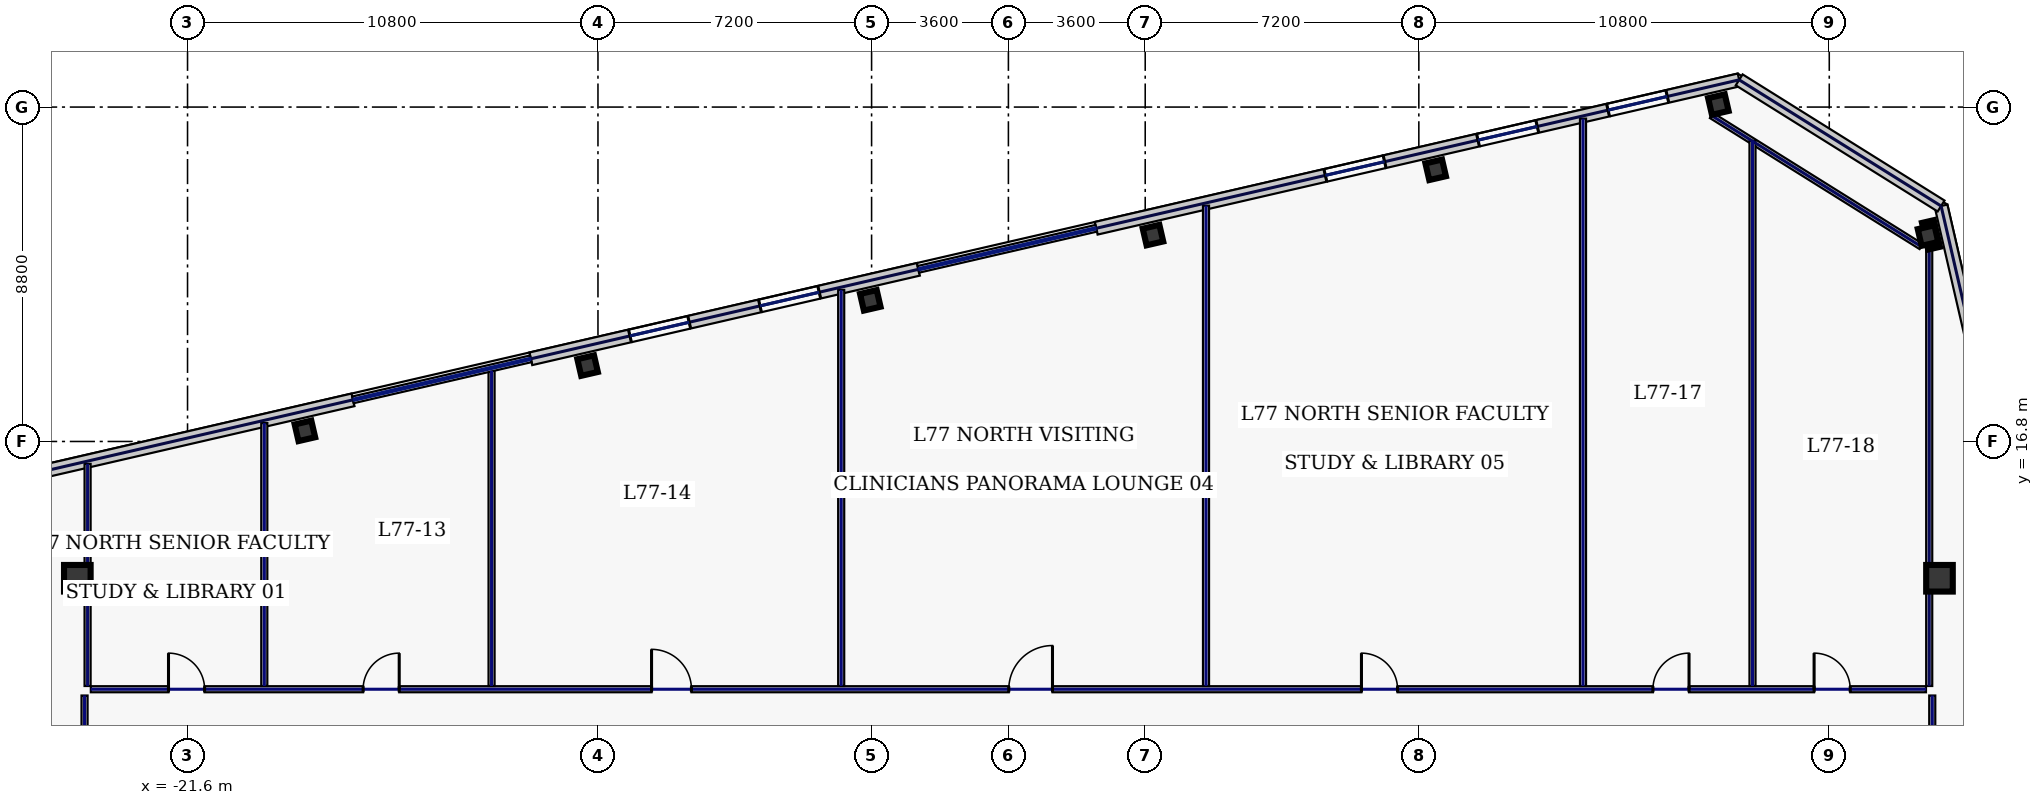
"""IFC4 building model, lengths in metres.
Left out: names, types, materials, properties, quantities, classifications, styles, units other than length and angle.
Written with IfcOpenShell. Run it as: python <this file> out.ifc"""

import sys

from ifc_helpers import new_model, si_unit, direction, frame, frame_2d, origin, origin_2d, place, context, subcontext, project, spatial, rectangle, hollow_rectangle, extrude, element, fill, save


model = new_model("IFC4")
c1 = context("Model", 3, precision=1e-05, world=origin(), true_north=direction((0.0, 1.0)))
c2 = subcontext(c1, "Body", "Model", "MODEL_VIEW")
j1 = project(units=[si_unit("LENGTHUNIT", "METRE"), si_unit("PLANEANGLEUNIT", "RADIAN")], contexts=[c1])
p1 = place(None, origin())
s1 = spatial("IfcSite", under=j1, at=p1, CompositionType="ELEMENT")
p2 = place(p1, origin())
s2 = spatial("IfcBuilding", under=s1, at=p2, CompositionType="ELEMENT")
p3 = place(p2, frame((0.0, 0.0, 329.0)))
s3 = spatial("IfcBuildingStorey", under=s2, at=p3, CompositionType="ELEMENT", Elevation=329.0)
for number, where, z_axis, x_axis in (
    (1, (-24.5, 13.2, 0.0), (0.0, 0.0, 1.0), (1.0, 0.0, 0.0)),
    (2, (24.5, 13.2, 0.0), (0.0, 0.0, 1.0), (1.0, 0.0, 0.0)),
):
    element("IfcColumn", number, at=place(p3, frame(where, z_axis=z_axis, x_axis=x_axis)), inside=s3, PredefinedType="COLUMN", context=c2, shape_type="SweptSolid", body=[
        extrude(hollow_rectangle(XDim=0.7, YDim=0.7, WallThickness=0.032, at=origin_2d()), origin(), (0.0, 0.0, 1.0), 3.68),
    ])
for number, where, z_axis, x_axis in (
    (3, (18.682, 25.666, 0.0), (0.0, 0.0, 1.0), (0.974, 0.225, 0.0)),
    (4, (11.243, 23.949, 0.0), (0.0, 0.0, 1.0), (0.974, 0.225, 0.0)),
    (5, (3.804, 22.232, 0.0), (0.0, 0.0, 1.0), (0.974, 0.225, 0.0)),
    (6, (-3.634, 20.514, 0.0), (0.0, 0.0, 1.0), (0.974, 0.225, 0.0)),
    (7, (-11.073, 18.797, 0.0), (0.0, 0.0, 1.0), (0.974, 0.225, 0.0)),
    (8, (-18.511, 17.08, 0.0), (0.0, 0.0, 1.0), (0.974, 0.225, 0.0)),
    (9, (24.198, 22.219, 0.0), (0.0, 0.0, 1.0), (0.974, 0.225, 0.0)),
):
    element("IfcColumn", number, at=place(p3, frame(where, z_axis=z_axis, x_axis=x_axis)), inside=s3, PredefinedType="COLUMN", context=c2, shape_type="SweptSolid", body=[
        extrude(hollow_rectangle(XDim=0.45, YDim=0.45, WallThickness=0.022, at=origin_2d()), origin(), (0.0, 0.0, 1.0), 3.68),
    ])
p4 = place(p3, frame((19.229, 26.316, 0.0), z_axis=(0.0, 0.0, 1.0), x_axis=(-0.974372473594, -0.224940620392, 0.0)))
e10 = element("IfcWall", 10, at=p4, inside=s3, PredefinedType="STANDARD", context=c2, shape_type="SweptSolid", body=[
    extrude(rectangle(XDim=17.366, YDim=0.34, at=frame_2d((8.683, 0.0))), origin(), (0.0, 0.0, 1.0), 3.68),
])
p5 = place(p4, frame((9.576, 0.0, 0.22)))
e11 = element("IfcOpeningElement", 11, at=p5, cuts=e10, PredefinedType="OPENING", context=c2, shape_type="SweptSolid", body=[
    extrude(rectangle(XDim=1.6, YDim=1.2, at=frame_2d((0.8, 0.6))), frame((0.0, 0.18, 0.0), z_axis=(0.0, -1.0, 0.0), x_axis=(1.0, 0.0, 0.0)), (0.0, 0.0, 1.0), 0.36),
])
p6 = place(p4, frame((5.453, 0.0, 0.22)))
e12 = element("IfcOpeningElement", 12, at=p6, cuts=e10, PredefinedType="OPENING", context=c2, shape_type="SweptSolid", body=[
    extrude(rectangle(XDim=1.6, YDim=1.2, at=frame_2d((0.8, 0.6))), frame((0.0, 0.18, 0.0), z_axis=(0.0, -1.0, 0.0), x_axis=(1.0, 0.0, 0.0)), (0.0, 0.0, 1.0), 0.36),
])
p7 = place(p4, frame((1.941, 0.0, 0.22)))
e13 = element("IfcOpeningElement", 13, at=p7, cuts=e10, PredefinedType="OPENING", context=c2, shape_type="SweptSolid", body=[
    extrude(rectangle(XDim=1.6, YDim=1.2, at=frame_2d((0.8, 0.6))), frame((0.0, 0.18, 0.0), z_axis=(0.0, -1.0, 0.0), x_axis=(1.0, 0.0, 0.0)), (0.0, 0.0, 1.0), 0.36),
])
p8 = place(p3, frame((-2.368, 21.33, 0.0), z_axis=(0.0, 0.0, 1.0), x_axis=(-0.974367213107, -0.224963405961, 0.0)))
e14 = element("IfcWall", 14, at=p8, inside=s3, PredefinedType="STANDARD", context=c2, shape_type="SweptSolid", body=[
    extrude(rectangle(XDim=10.468, YDim=0.34, at=frame_2d((5.234, 0.0))), origin(), (0.0, 0.0, 1.0), 3.68),
])
p9 = place(p8, frame((6.19, 0.0, 0.22)))
e15 = element("IfcOpeningElement", 15, at=p9, cuts=e14, PredefinedType="OPENING", context=c2, shape_type="SweptSolid", body=[
    extrude(rectangle(XDim=1.6, YDim=1.2, at=frame_2d((0.8, 0.6))), frame((0.0, 0.18, 0.0), z_axis=(0.0, -1.0, 0.0), x_axis=(1.0, 0.0, 0.0)), (0.0, 0.0, 1.0), 0.36),
])
p10 = place(p8, frame((2.678, 0.0, 0.22)))
e16 = element("IfcOpeningElement", 16, at=p10, cuts=e14, PredefinedType="OPENING", context=c2, shape_type="SweptSolid", body=[
    extrude(rectangle(XDim=1.6, YDim=1.2, at=frame_2d((0.8, 0.6))), frame((0.0, 0.18, 0.0), z_axis=(0.0, -1.0, 0.0), x_axis=(1.0, 0.0, 0.0)), (0.0, 0.0, 1.0), 0.36),
])
p11 = place(p3, frame((-17.245, 17.895, 0.0), z_axis=(0.0, 0.0, 1.0), x_axis=(-0.97437318493, -0.224937539085, 0.0)))
e17 = element("IfcWall", 17, at=p11, inside=s3, PredefinedType="STANDARD", context=c2, shape_type="SweptSolid", body=[
    extrude(rectangle(XDim=17.366, YDim=0.34, at=frame_2d((8.683, 0.0))), origin(), (0.0, 0.0, 1.0), 3.68),
])
p12 = place(p11, frame((13.825, 0.0, 0.22)))
e18 = element("IfcOpeningElement", 18, at=p12, cuts=e17, PredefinedType="OPENING", context=c2, shape_type="SweptSolid", body=[
    extrude(rectangle(XDim=1.6, YDim=1.2, at=frame_2d((0.8, 0.6))), frame((0.0, 0.18, 0.0), z_axis=(0.0, -1.0, 0.0), x_axis=(1.0, 0.0, 0.0)), (0.0, 0.0, 1.0), 0.36),
])
p13 = place(p11, frame((10.313, 0.0, 0.22)))
e19 = element("IfcOpeningElement", 19, at=p13, cuts=e17, PredefinedType="OPENING", context=c2, shape_type="SweptSolid", body=[
    extrude(rectangle(XDim=1.6, YDim=1.2, at=frame_2d((0.8, 0.6))), frame((0.0, 0.18, 0.0), z_axis=(0.0, -1.0, 0.0), x_axis=(1.0, 0.0, 0.0)), (0.0, 0.0, 1.0), 0.36),
])
p14 = place(p3, frame((32.686, -12.276, 0.0), z_axis=(0.0, 0.0, 1.0), x_axis=(-0.224953091034, 0.974369594576, 0.0)))
e20 = element("IfcWall", 20, at=p14, inside=s3, PredefinedType="STANDARD", context=c2, shape_type="SweptSolid", body=[
    extrude(rectangle(XDim=36.2, YDim=0.34, at=frame_2d((18.1, 0.0))), origin(), (0.0, 0.0, 1.0), 3.68),
])
p15 = place(p14, frame((3.725, 0.0, 0.22)))
e21 = element("IfcOpeningElement", 21, at=p15, cuts=e20, PredefinedType="OPENING", context=c2, shape_type="SweptSolid", body=[
    extrude(rectangle(XDim=1.6, YDim=1.2, at=frame_2d((0.8, 0.6))), frame((0.0, 0.18, 0.0), z_axis=(0.0, -1.0, 0.0), x_axis=(1.0, 0.0, 0.0)), (0.0, 0.0, 1.0), 0.36),
])
p16 = place(p14, frame((21.825, 0.0, 0.22)))
e22 = element("IfcOpeningElement", 22, at=p16, cuts=e20, PredefinedType="OPENING", context=c2, shape_type="SweptSolid", body=[
    extrude(rectangle(XDim=1.6, YDim=1.2, at=frame_2d((0.8, 0.6))), frame((0.0, 0.18, 0.0), z_axis=(0.0, -1.0, 0.0), x_axis=(1.0, 0.0, 0.0)), (0.0, 0.0, 1.0), 0.36),
])
p17 = place(p14, frame((30.875, 0.0, 0.22)))
e23 = element("IfcOpeningElement", 23, at=p17, cuts=e20, PredefinedType="OPENING", context=c2, shape_type="SweptSolid", body=[
    extrude(rectangle(XDim=1.6, YDim=1.2, at=frame_2d((0.8, 0.6))), frame((0.0, 0.18, 0.0), z_axis=(0.0, -1.0, 0.0), x_axis=(1.0, 0.0, 0.0)), (0.0, 0.0, 1.0), 0.36),
])
p18 = place(p3, frame((24.542, 22.996, 0.0), z_axis=(0.0, 0.0, 1.0), x_axis=(-0.848055220921, 0.529907862057, 0.0)))
e24 = element("IfcWall", 24, at=p18, inside=s3, PredefinedType="STANDARD", context=c2, shape_type="SweptSolid", body=[
    extrude(rectangle(XDim=6.265, YDim=0.34, at=frame_2d((3.132, 0.0))), origin(), (0.0, 0.0, 1.0), 3.68),
])
p19 = place(p3, frame((24.018, 21.931, 0.0), z_axis=(0.0, 0.0, 1.0), x_axis=(-0.848051009591, 0.529914601736, 0.0)))
e25 = element("IfcWall", 25, at=p19, inside=s3, PredefinedType="PARTITIONING", context=c2, shape_type="SweptSolid", body=[
    extrude(rectangle(XDim=6.505, YDim=0.16, at=frame_2d((3.253, 0.0))), origin(), (0.0, 0.0, 1.0), 1.475),
])
p20 = place(p3, frame((-24.31, -10.015, 0.0), z_axis=(0.0, 0.0, 1.0), x_axis=(0.0, 1.0, 0.0)))
e26 = element("IfcWall", 26, at=p20, inside=s3, PredefinedType="PARTITIONING", context=c2, shape_type="SweptSolid", body=[
    extrude(rectangle(XDim=20.13, YDim=0.16, at=frame_2d((10.065, 0.0))), origin(), (0.0, 0.0, 1.0), 3.68),
])
p21 = place(p20, frame((2.169, 0.0, 0.0)))
e27 = element("IfcOpeningElement", 27, at=p21, cuts=e26, PredefinedType="OPENING", context=c2, shape_type="SweptSolid", body=[
    extrude(rectangle(XDim=0.95, YDim=2.2, at=frame_2d((0.475, 1.1))), frame((0.0, 0.09, 0.0), z_axis=(0.0, -1.0, 0.0), x_axis=(1.0, 0.0, 0.0)), (0.0, 0.0, 1.0), 0.18),
])
p22 = place(p20, frame((7.025, 0.0, 0.0)))
e28 = element("IfcOpeningElement", 28, at=p22, cuts=e26, PredefinedType="OPENING", context=c2, shape_type="SweptSolid", body=[
    extrude(rectangle(XDim=0.95, YDim=2.2, at=frame_2d((0.475, 1.1))), frame((0.0, 0.09, 0.0), z_axis=(0.0, -1.0, 0.0), x_axis=(1.0, 0.0, 0.0)), (0.0, 0.0, 1.0), 0.18),
])
p23 = place(p20, frame((12.225, 0.0, 0.0)))
e29 = element("IfcOpeningElement", 29, at=p23, cuts=e26, PredefinedType="OPENING", context=c2, shape_type="SweptSolid", body=[
    extrude(rectangle(XDim=0.95, YDim=2.2, at=frame_2d((0.475, 1.1))), frame((0.0, 0.09, 0.0), z_axis=(0.0, -1.0, 0.0), x_axis=(1.0, 0.0, 0.0)), (0.0, 0.0, 1.0), 0.18),
])
p24 = place(p20, frame((17.131, 0.0, 0.0)))
e30 = element("IfcOpeningElement", 30, at=p24, cuts=e26, PredefinedType="OPENING", context=c2, shape_type="SweptSolid", body=[
    extrude(rectangle(XDim=0.95, YDim=2.2, at=frame_2d((0.475, 1.1))), frame((0.0, 0.09, 0.0), z_axis=(0.0, -1.0, 0.0), x_axis=(1.0, 0.0, 0.0)), (0.0, 0.0, 1.0), 0.18),
])
p25 = place(p3, frame((-24.145, 10.28, 0.0), z_axis=(0.0, 0.0, 1.0), x_axis=(1.0, 0.0, 0.0)))
e31 = element("IfcWall", 31, at=p25, inside=s3, PredefinedType="PARTITIONING", context=c2, shape_type="SweptSolid", body=[
    extrude(rectangle(XDim=48.29, YDim=0.16, at=frame_2d((24.145, 0.0))), origin(), (0.0, 0.0, 1.0), 3.68),
])
p26 = place(p25, frame((2.044, 0.0, 0.0)))
e32 = element("IfcOpeningElement", 32, at=p26, cuts=e31, PredefinedType="OPENING", context=c2, shape_type="SweptSolid", body=[
    extrude(rectangle(XDim=0.95, YDim=2.2, at=frame_2d((0.475, 1.1))), frame((0.0, 0.09, 0.0), z_axis=(0.0, -1.0, 0.0), x_axis=(1.0, 0.0, 0.0)), (0.0, 0.0, 1.0), 0.18),
])
p27 = place(p25, frame((7.165, 0.0, 0.0)))
e33 = element("IfcOpeningElement", 33, at=p27, cuts=e31, PredefinedType="OPENING", context=c2, shape_type="SweptSolid", body=[
    extrude(rectangle(XDim=0.95, YDim=2.2, at=frame_2d((0.475, 1.1))), frame((0.0, 0.09, 0.0), z_axis=(0.0, -1.0, 0.0), x_axis=(1.0, 0.0, 0.0)), (0.0, 0.0, 1.0), 0.18),
])
p28 = place(p25, frame((14.755, 0.0, 0.0)))
e34 = element("IfcOpeningElement", 34, at=p28, cuts=e31, PredefinedType="OPENING", context=c2, shape_type="SweptSolid", body=[
    extrude(rectangle(XDim=1.05, YDim=2.2, at=frame_2d((0.525, 1.1))), frame((0.0, 0.09, 0.0), z_axis=(0.0, -1.0, 0.0), x_axis=(1.0, 0.0, 0.0)), (0.0, 0.0, 1.0), 0.18),
])
p29 = place(p25, frame((24.155, 0.0, 0.0)))
e35 = element("IfcOpeningElement", 35, at=p29, cuts=e31, PredefinedType="OPENING", context=c2, shape_type="SweptSolid", body=[
    extrude(rectangle(XDim=1.15, YDim=2.2, at=frame_2d((0.575, 1.1))), frame((0.0, 0.09, 0.0), z_axis=(0.0, -1.0, 0.0), x_axis=(1.0, 0.0, 0.0)), (0.0, 0.0, 1.0), 0.18),
])
p30 = place(p25, frame((33.435, 0.0, 0.0)))
e36 = element("IfcOpeningElement", 36, at=p30, cuts=e31, PredefinedType="OPENING", context=c2, shape_type="SweptSolid", body=[
    extrude(rectangle(XDim=0.95, YDim=2.2, at=frame_2d((0.475, 1.1))), frame((0.0, 0.09, 0.0), z_axis=(0.0, -1.0, 0.0), x_axis=(1.0, 0.0, 0.0)), (0.0, 0.0, 1.0), 0.18),
])
p31 = place(p25, frame((41.105, 0.0, 0.0)))
e37 = element("IfcOpeningElement", 37, at=p31, cuts=e31, PredefinedType="OPENING", context=c2, shape_type="SweptSolid", body=[
    extrude(rectangle(XDim=0.95, YDim=2.2, at=frame_2d((0.475, 1.1))), frame((0.0, 0.09, 0.0), z_axis=(0.0, -1.0, 0.0), x_axis=(1.0, 0.0, 0.0)), (0.0, 0.0, 1.0), 0.18),
])
p32 = place(p25, frame((45.346, 0.0, 0.0)))
e38 = element("IfcOpeningElement", 38, at=p32, cuts=e31, PredefinedType="OPENING", context=c2, shape_type="SweptSolid", body=[
    extrude(rectangle(XDim=0.95, YDim=2.2, at=frame_2d((0.475, 1.1))), frame((0.0, 0.09, 0.0), z_axis=(0.0, -1.0, 0.0), x_axis=(1.0, 0.0, 0.0)), (0.0, 0.0, 1.0), 0.18),
])
p33 = place(p3, frame((24.31, 10.115, 0.0), z_axis=(0.0, 0.0, 1.0), x_axis=(0.0, -1.0, 0.0)))
e39 = element("IfcWall", 39, at=p33, inside=s3, PredefinedType="PARTITIONING", context=c2, shape_type="SweptSolid", body=[
    extrude(rectangle(XDim=20.13, YDim=0.16, at=frame_2d((10.065, 0.0))), origin(), (0.0, 0.0, 1.0), 3.68),
])
p34 = place(p33, frame((14.581, 0.0, 0.0)))
e40 = element("IfcOpeningElement", 40, at=p34, cuts=e39, PredefinedType="OPENING", context=c2, shape_type="SweptSolid", body=[
    extrude(rectangle(XDim=0.95, YDim=2.2, at=frame_2d((0.475, 1.1))), frame((0.0, 0.09, 0.0), z_axis=(0.0, -1.0, 0.0), x_axis=(1.0, 0.0, 0.0)), (0.0, 0.0, 1.0), 0.18),
])
p35 = place(p33, frame((4.819, 0.0, 0.0)))
e41 = element("IfcOpeningElement", 41, at=p35, cuts=e39, PredefinedType="OPENING", context=c2, shape_type="SweptSolid", body=[
    extrude(rectangle(XDim=0.95, YDim=2.2, at=frame_2d((0.475, 1.1))), frame((0.0, 0.09, 0.0), z_axis=(0.0, -1.0, 0.0), x_axis=(1.0, 0.0, 0.0)), (0.0, 0.0, 1.0), 0.18),
])
p36 = place(p3, frame((-24.23, 10.365, 0.0), z_axis=(0.0, 0.0, 1.0), x_axis=(0.0, 1.0, 0.0)))
e42 = element("IfcWall", 42, at=p36, inside=s3, PredefinedType="PARTITIONING", context=c2, shape_type="SweptSolid", body=[
    extrude(rectangle(XDim=5.846, YDim=0.16, at=frame_2d((2.923, 0.0))), origin(), (0.0, 0.0, 1.0), 2.075),
])
p37 = place(p3, frame((24.23, 10.365, 0.0), z_axis=(0.0, 0.0, 1.0), x_axis=(0.0, 1.0, 0.0)))
e43 = element("IfcWall", 43, at=p37, inside=s3, PredefinedType="PARTITIONING", context=c2, shape_type="SweptSolid", body=[
    extrude(rectangle(XDim=12.206, YDim=0.16, at=frame_2d((6.103, 0.0))), origin(), (0.0, 0.0, 1.0), 1.475),
])
p38 = place(p3, frame((-19.58, 10.365, 0.0), z_axis=(0.0, 0.0, 1.0), x_axis=(0.0, 1.0, 0.0)))
e44 = element("IfcWall", 44, at=p38, inside=s3, PredefinedType="PARTITIONING", context=c2, shape_type="SweptSolid", body=[
    extrude(rectangle(XDim=6.919, YDim=0.16, at=frame_2d((3.46, 0.0))), origin(), (0.0, 0.0, 1.0), 3.68),
])
p39 = place(p3, frame((-13.6, 10.365, 0.0), z_axis=(0.0, 0.0, 1.0), x_axis=(0.0, 1.0, 0.0)))
e45 = element("IfcWall", 45, at=p39, inside=s3, PredefinedType="PARTITIONING", context=c2, shape_type="SweptSolid", body=[
    extrude(rectangle(XDim=8.3, YDim=0.16, at=frame_2d((4.15, 0.0))), origin(), (0.0, 0.0, 1.0), 3.68),
])
p40 = place(p3, frame((-4.4, 10.365, 0.0), z_axis=(0.0, 0.0, 1.0), x_axis=(0.0, 1.0, 0.0)))
e46 = element("IfcWall", 46, at=p40, inside=s3, PredefinedType="PARTITIONING", context=c2, shape_type="SweptSolid", body=[
    extrude(rectangle(XDim=10.424, YDim=0.16, at=frame_2d((5.212, 0.0))), origin(), (0.0, 0.0, 1.0), 3.68),
])
p41 = place(p3, frame((5.2, 10.365, 0.0), z_axis=(0.0, 0.0, 1.0), x_axis=(0.0, 1.0, 0.0)))
e47 = element("IfcWall", 47, at=p41, inside=s3, PredefinedType="PARTITIONING", context=c2, shape_type="SweptSolid", body=[
    extrude(rectangle(XDim=12.64, YDim=0.16, at=frame_2d((6.32, 0.0))), origin(), (0.0, 0.0, 1.0), 3.68),
])
p42 = place(p3, frame((15.12, 10.365, 0.0), z_axis=(0.0, 0.0, 1.0), x_axis=(0.0, 1.0, 0.0)))
e48 = element("IfcWall", 48, at=p42, inside=s3, PredefinedType="PARTITIONING", context=c2, shape_type="SweptSolid", body=[
    extrude(rectangle(XDim=14.931, YDim=0.16, at=frame_2d((7.465, 0.0))), origin(), (0.0, 0.0, 1.0), 3.68),
])
p43 = place(p3, frame((19.58, 10.365, 0.0), z_axis=(0.0, 0.0, 1.0), x_axis=(0.0, 1.0, 0.0)))
e49 = element("IfcWall", 49, at=p43, inside=s3, PredefinedType="PARTITIONING", context=c2, shape_type="SweptSolid", body=[
    extrude(rectangle(XDim=14.348, YDim=0.16, at=frame_2d((7.174, 0.0))), origin(), (0.0, 0.0, 1.0), 3.68),
])
p44 = place(p5, origin())
e50 = element("IfcWindow", 50, at=p44, inside=s3, PartitioningType="SINGLE_PANEL", PredefinedType="WINDOW", context=c2, shape_type="SweptSolid", body=[
    extrude(rectangle(XDim=1.6, YDim=1.2, at=frame_2d((0.8, 0.6))), frame((0.0, 0.03, 0.0), z_axis=(0.0, -1.0, 0.0), x_axis=(1.0, 0.0, 0.0)), (0.0, 0.0, 1.0), 0.06),
])
fill(e11, e50)
p45 = place(p6, origin())
e51 = element("IfcWindow", 51, at=p45, inside=s3, PartitioningType="SINGLE_PANEL", PredefinedType="WINDOW", context=c2, shape_type="SweptSolid", body=[
    extrude(rectangle(XDim=1.6, YDim=1.2, at=frame_2d((0.8, 0.6))), frame((0.0, 0.03, 0.0), z_axis=(0.0, -1.0, 0.0), x_axis=(1.0, 0.0, 0.0)), (0.0, 0.0, 1.0), 0.06),
])
fill(e12, e51)
p46 = place(p7, origin())
e52 = element("IfcWindow", 52, at=p46, inside=s3, PartitioningType="SINGLE_PANEL", PredefinedType="WINDOW", context=c2, shape_type="SweptSolid", body=[
    extrude(rectangle(XDim=1.6, YDim=1.2, at=frame_2d((0.8, 0.6))), frame((0.0, 0.03, 0.0), z_axis=(0.0, -1.0, 0.0), x_axis=(1.0, 0.0, 0.0)), (0.0, 0.0, 1.0), 0.06),
])
fill(e13, e52)
p47 = place(p9, origin())
e53 = element("IfcWindow", 53, at=p47, inside=s3, PartitioningType="SINGLE_PANEL", PredefinedType="WINDOW", context=c2, shape_type="SweptSolid", body=[
    extrude(rectangle(XDim=1.6, YDim=1.2, at=frame_2d((0.8, 0.6))), frame((0.0, 0.03, 0.0), z_axis=(0.0, -1.0, 0.0), x_axis=(1.0, 0.0, 0.0)), (0.0, 0.0, 1.0), 0.06),
])
fill(e15, e53)
p48 = place(p10, origin())
e54 = element("IfcWindow", 54, at=p48, inside=s3, PartitioningType="SINGLE_PANEL", PredefinedType="WINDOW", context=c2, shape_type="SweptSolid", body=[
    extrude(rectangle(XDim=1.6, YDim=1.2, at=frame_2d((0.8, 0.6))), frame((0.0, 0.03, 0.0), z_axis=(0.0, -1.0, 0.0), x_axis=(1.0, 0.0, 0.0)), (0.0, 0.0, 1.0), 0.06),
])
fill(e16, e54)
p49 = place(p26, origin())
e55 = element("IfcDoor", 55, at=p49, inside=s3, OperationType="SINGLE_SWING_LEFT", PredefinedType="DOOR", context=c2, shape_type="SweptSolid", body=[
    extrude(rectangle(XDim=0.95, YDim=2.2, at=frame_2d((0.475, 1.1))), frame((0.0, 0.025, 0.0), z_axis=(0.0, -1.0, 0.0), x_axis=(1.0, 0.0, 0.0)), (0.0, 0.0, 1.0), 0.05),
])
fill(e32, e55)
p50 = place(p27, origin())
e56 = element("IfcDoor", 56, at=p50, inside=s3, OperationType="SINGLE_SWING_RIGHT", PredefinedType="DOOR", context=c2, shape_type="SweptSolid", body=[
    extrude(rectangle(XDim=0.95, YDim=2.2, at=frame_2d((0.475, 1.1))), frame((0.0, 0.025, 0.0), z_axis=(0.0, -1.0, 0.0), x_axis=(1.0, 0.0, 0.0)), (0.0, 0.0, 1.0), 0.05),
])
fill(e33, e56)
p51 = place(p28, origin())
e57 = element("IfcDoor", 57, at=p51, inside=s3, OperationType="SINGLE_SWING_LEFT", PredefinedType="DOOR", context=c2, shape_type="SweptSolid", body=[
    extrude(rectangle(XDim=1.05, YDim=2.2, at=frame_2d((0.525, 1.1))), frame((0.0, 0.025, 0.0), z_axis=(0.0, -1.0, 0.0), x_axis=(1.0, 0.0, 0.0)), (0.0, 0.0, 1.0), 0.05),
])
fill(e34, e57)
p52 = place(p29, origin())
e58 = element("IfcDoor", 58, at=p52, inside=s3, OperationType="SINGLE_SWING_RIGHT", PredefinedType="DOOR", context=c2, shape_type="SweptSolid", body=[
    extrude(rectangle(XDim=1.15, YDim=2.2, at=frame_2d((0.575, 1.1))), frame((0.0, 0.025, 0.0), z_axis=(0.0, -1.0, 0.0), x_axis=(1.0, 0.0, 0.0)), (0.0, 0.0, 1.0), 0.05),
])
fill(e35, e58)
p53 = place(p30, origin())
e59 = element("IfcDoor", 59, at=p53, inside=s3, OperationType="SINGLE_SWING_LEFT", PredefinedType="DOOR", context=c2, shape_type="SweptSolid", body=[
    extrude(rectangle(XDim=0.95, YDim=2.2, at=frame_2d((0.475, 1.1))), frame((0.0, 0.025, 0.0), z_axis=(0.0, -1.0, 0.0), x_axis=(1.0, 0.0, 0.0)), (0.0, 0.0, 1.0), 0.05),
])
fill(e36, e59)
p54 = place(p31, origin())
e60 = element("IfcDoor", 60, at=p54, inside=s3, OperationType="SINGLE_SWING_RIGHT", PredefinedType="DOOR", context=c2, shape_type="SweptSolid", body=[
    extrude(rectangle(XDim=0.95, YDim=2.2, at=frame_2d((0.475, 1.1))), frame((0.0, 0.025, 0.0), z_axis=(0.0, -1.0, 0.0), x_axis=(1.0, 0.0, 0.0)), (0.0, 0.0, 1.0), 0.05),
])
fill(e37, e60)
p55 = place(p32, origin())
e61 = element("IfcDoor", 61, at=p55, inside=s3, OperationType="SINGLE_SWING_LEFT", PredefinedType="DOOR", context=c2, shape_type="SweptSolid", body=[
    extrude(rectangle(XDim=0.95, YDim=2.2, at=frame_2d((0.475, 1.1))), frame((0.0, 0.025, 0.0), z_axis=(0.0, -1.0, 0.0), x_axis=(1.0, 0.0, 0.0)), (0.0, 0.0, 1.0), 0.05),
])
fill(e38, e61)
save(model, sys.argv[1])
